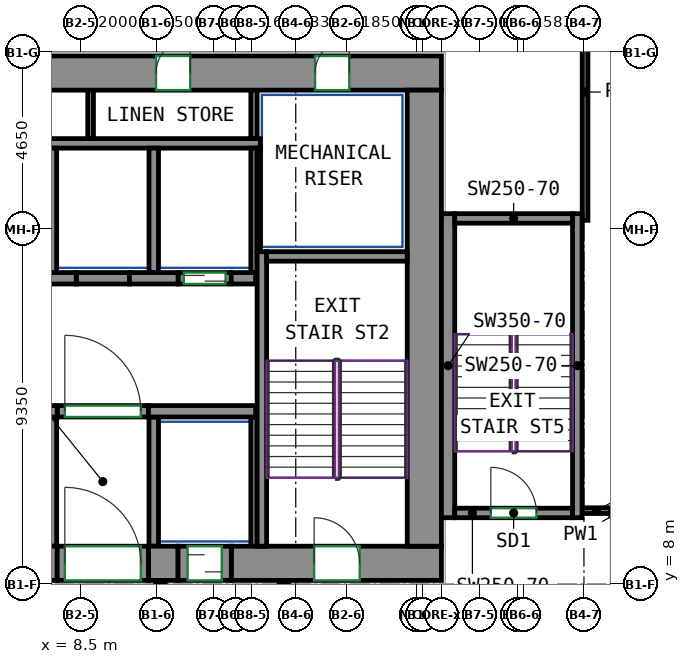
"""IFC4 building model, lengths in metres.
Left out: names, types, materials, properties, quantities, classifications, styles, units other than length and angle.
Written with IfcOpenShell. Run it as: python <this file> out.ifc"""

import sys

from ifc_helpers import new_model, si_unit, direction, frame, frame_2d, origin, place, context, subcontext, project, spatial, rectangle, extrude, source, transform, mapped, element, fill, save


model = new_model("IFC4")
c1 = context("Model", 3, precision=1e-05, world=origin(), true_north=direction((0.0, 1.0)))
c2 = subcontext(c1, "Body", "Model", "MODEL_VIEW")
j1 = project(units=[si_unit("LENGTHUNIT", "METRE"), si_unit("PLANEANGLEUNIT", "RADIAN")], contexts=[c1])
p1 = place(None, origin())
s1 = spatial("IfcSite", under=j1, at=p1, CompositionType="ELEMENT")
p2 = place(p1, origin())
s2 = spatial("IfcBuilding", under=s1, at=p2, CompositionType="ELEMENT")
p3 = place(p2, frame((0.0, 0.0, 164.3)))
s3 = spatial("IfcBuildingStorey", under=s2, at=p3, CompositionType="ELEMENT", Elevation=164.3)
m1 = source(origin(), c2, "Body", "SweptSolid", [
    extrude(rectangle(XDim=14.18, YDim=0.9, at=frame_2d((7.09, 0.0))), origin(), (0.0, 0.0, 1.0), 3.8),
])
p4 = place(p3, frame((-6.29, 8.55, 0.0), z_axis=(0.0, 0.0, 1.0), x_axis=(1.0, 0.0, 0.0)))
e1 = element("IfcWall", 1, at=p4, inside=s3, PredefinedType="SHEAR", context=c2, shape_type="MappedRepresentation", body=[
    mapped(m1, transform((0.0, 0.0, 0.0))),
])
m2 = source(origin(), c2, "Body", "SweptSolid", [
    extrude(rectangle(XDim=0.78, YDim=0.9, at=frame_2d((0.39, 0.0))), origin(), (0.0, 0.0, 1.0), 3.8),
])
p5 = place(p3, frame((10.29, 8.55, 0.0), z_axis=(0.0, 0.0, 1.0), x_axis=(1.0, 0.0, 0.0)))
e2 = element("IfcWall", 2, at=p5, inside=s3, PredefinedType="SHEAR", context=c2, shape_type="MappedRepresentation", body=[
    mapped(m2, transform((0.0, 0.0, 0.0))),
])
m3 = source(origin(), c2, "Body", "SweptSolid", [
    extrude(rectangle(XDim=5.53, YDim=0.9, at=frame_2d((2.765, 0.0))), origin(), (0.0, 0.0, 1.0), 3.8),
])
p6 = place(p3, frame((12.47, 8.55, 0.0), z_axis=(0.0, 0.0, 1.0), x_axis=(1.0, 0.0, 0.0)))
e3 = element("IfcWall", 3, at=p6, inside=s3, PredefinedType="SHEAR", context=c2, shape_type="MappedRepresentation", body=[
    mapped(m3, transform((0.0, 0.0, 0.0))),
])
p7 = place(p6, frame((2.18, 0.0, 0.0)))
e4 = element("IfcOpeningElement", 4, at=p7, cuts=e3, PredefinedType="OPENING", context=c2, shape_type="SweptSolid", body=[
    extrude(rectangle(XDim=1.2, YDim=2.1, at=frame_2d((0.6, 1.05))), frame((0.0, 0.46, 0.0), z_axis=(0.0, -1.0, 0.0), x_axis=(1.0, 0.0, 0.0)), (0.0, 0.0, 1.0), 0.92),
])
m4 = source(origin(), c2, "Body", "SweptSolid", [
    extrude(rectangle(XDim=33.9, YDim=0.9, at=frame_2d((16.95, 0.0))), origin(), (0.0, 0.0, 1.0), 3.8),
])
p8 = place(p3, frame((-15.9, 21.45, 0.0), z_axis=(0.0, 0.0, 1.0), x_axis=(1.0, 0.0, 0.0)))
e5 = element("IfcWall", 5, at=p8, inside=s3, PredefinedType="SHEAR", context=c2, shape_type="MappedRepresentation", body=[
    mapped(m4, transform((0.0, 0.0, 0.0))),
])
p9 = place(p8, frame((6.008, 0.0, 0.0)))
e6 = element("IfcOpeningElement", 6, at=p9, cuts=e5, PredefinedType="OPENING", context=c2, shape_type="SweptSolid", body=[
    extrude(rectangle(XDim=0.9, YDim=2.1, at=frame_2d((0.45, 1.05))), frame((0.0, 0.46, 0.0), z_axis=(0.0, -1.0, 0.0), x_axis=(1.0, 0.0, 0.0)), (0.0, 0.0, 1.0), 0.92),
])
p10 = place(p8, frame((11.073, 0.0, 0.0)))
e7 = element("IfcOpeningElement", 7, at=p10, cuts=e5, PredefinedType="OPENING", context=c2, shape_type="SweptSolid", body=[
    extrude(rectangle(XDim=0.9, YDim=2.1, at=frame_2d((0.45, 1.05))), frame((0.0, 0.46, 0.0), z_axis=(0.0, -1.0, 0.0), x_axis=(1.0, 0.0, 0.0)), (0.0, 0.0, 1.0), 0.92),
])
p11 = place(p8, frame((16.205, 0.0, 0.0)))
e8 = element("IfcOpeningElement", 8, at=p11, cuts=e5, PredefinedType="OPENING", context=c2, shape_type="SweptSolid", body=[
    extrude(rectangle(XDim=0.9, YDim=2.1, at=frame_2d((0.45, 1.05))), frame((0.0, 0.46, 0.0), z_axis=(0.0, -1.0, 0.0), x_axis=(1.0, 0.0, 0.0)), (0.0, 0.0, 1.0), 0.92),
])
p12 = place(p8, frame((21.029, 0.0, 0.0)))
e9 = element("IfcOpeningElement", 9, at=p12, cuts=e5, PredefinedType="OPENING", context=c2, shape_type="SweptSolid", body=[
    extrude(rectangle(XDim=0.9, YDim=2.1, at=frame_2d((0.45, 1.05))), frame((0.0, 0.46, 0.0), z_axis=(0.0, -1.0, 0.0), x_axis=(1.0, 0.0, 0.0)), (0.0, 0.0, 1.0), 0.92),
])
p13 = place(p8, frame((26.389, 0.0, 0.0)))
e10 = element("IfcOpeningElement", 10, at=p13, cuts=e5, PredefinedType="OPENING", context=c2, shape_type="SweptSolid", body=[
    extrude(rectangle(XDim=0.9, YDim=2.1, at=frame_2d((0.45, 1.05))), frame((0.0, 0.46, 0.0), z_axis=(0.0, -1.0, 0.0), x_axis=(1.0, 0.0, 0.0)), (0.0, 0.0, 1.0), 0.92),
])
p14 = place(p8, frame((2.425, 0.0, 0.0)))
e11 = element("IfcOpeningElement", 11, at=p14, cuts=e5, PredefinedType="OPENING", context=c2, shape_type="SweptSolid", body=[
    extrude(rectangle(XDim=0.9, YDim=2.1, at=frame_2d((0.45, 1.05))), frame((0.0, 0.46, 0.0), z_axis=(0.0, -1.0, 0.0), x_axis=(1.0, 0.0, 0.0)), (0.0, 0.0, 1.0), 0.92),
])
p15 = place(p8, frame((30.575, 0.0, 0.0)))
e12 = element("IfcOpeningElement", 12, at=p15, cuts=e5, PredefinedType="OPENING", context=c2, shape_type="SweptSolid", body=[
    extrude(rectangle(XDim=0.9, YDim=2.1, at=frame_2d((0.45, 1.05))), frame((0.0, 0.46, 0.0), z_axis=(0.0, -1.0, 0.0), x_axis=(1.0, 0.0, 0.0)), (0.0, 0.0, 1.0), 0.92),
])
m5 = source(origin(), c2, "Body", "SweptSolid", [
    extrude(rectangle(XDim=12.0, YDim=0.9, at=frame_2d((6.0, 0.0))), origin(), (0.0, 0.0, 1.0), 3.8),
])
p16 = place(p3, frame((17.55, 9.0, 0.0), z_axis=(0.0, 0.0, 1.0), x_axis=(0.0, 1.0, 0.0)))
e13 = element("IfcWall", 13, at=p16, inside=s3, PredefinedType="SHEAR", context=c2, shape_type="MappedRepresentation", body=[
    mapped(m5, transform((0.0, 0.0, 0.0))),
])
m6 = source(origin(), c2, "Body", "SweptSolid", [
    extrude(rectangle(XDim=7.75, YDim=0.25, at=frame_2d((3.875, 0.0))), origin(), (0.0, 0.0, 1.0), 3.8),
])
p17 = place(p3, frame((13.275, 9.0, 0.0), z_axis=(0.0, 0.0, 1.0), x_axis=(0.0, 1.0, 0.0)))
e14 = element("IfcWall", 14, at=p17, inside=s3, PredefinedType="SHEAR", context=c2, shape_type="MappedRepresentation", body=[
    mapped(m6, transform((0.0, 0.0, 0.0))),
])
m7 = source(origin(), c2, "Body", "SweptSolid", [
    extrude(rectangle(XDim=3.7, YDim=0.25, at=frame_2d((1.85, 0.0))), origin(), (0.0, 0.0, 1.0), 3.8),
])
p18 = place(p3, frame((13.4, 16.625, 0.0), z_axis=(0.0, 0.0, 1.0), x_axis=(1.0, 0.0, 0.0)))
e15 = element("IfcWall", 15, at=p18, inside=s3, PredefinedType="SHEAR", context=c2, shape_type="MappedRepresentation", body=[
    mapped(m7, transform((0.0, 0.0, 0.0))),
])
m8 = source(origin(), c2, "Body", "SweptSolid", [
    extrude(rectangle(XDim=8.0, YDim=0.35, at=frame_2d((4.0, 0.0))), origin(), (0.0, 0.0, 1.0), 3.8),
])
p19 = place(p3, frame((18.175, 9.75, 0.0), z_axis=(0.0, 0.0, 1.0), x_axis=(0.0, 1.0, 0.0)))
e16 = element("IfcWall", 16, at=p19, inside=s3, PredefinedType="SHEAR", context=c2, shape_type="MappedRepresentation", body=[
    mapped(m8, transform((0.0, 0.0, 0.0))),
])
m9 = source(origin(), c2, "Body", "SweptSolid", [
    extrude(rectangle(XDim=8.0, YDim=0.25, at=frame_2d((4.0, 0.0))), origin(), (0.0, 0.0, 1.0), 3.8),
])
p20 = place(p3, frame((21.575, 9.75, 0.0), z_axis=(0.0, 0.0, 1.0), x_axis=(0.0, 1.0, 0.0)))
e17 = element("IfcWall", 17, at=p20, inside=s3, PredefinedType="SHEAR", context=c2, shape_type="MappedRepresentation", body=[
    mapped(m9, transform((0.0, 0.0, 0.0))),
])
m10 = source(origin(), c2, "Body", "SweptSolid", [
    extrude(rectangle(XDim=3.1, YDim=0.25, at=frame_2d((1.55, 0.0))), origin(), (0.0, 0.0, 1.0), 3.8),
])
p21 = place(p3, frame((18.35, 9.875, 0.0), z_axis=(0.0, 0.0, 1.0), x_axis=(1.0, 0.0, 0.0)))
e18 = element("IfcWall", 18, at=p21, inside=s3, PredefinedType="SHEAR", context=c2, shape_type="MappedRepresentation", body=[
    mapped(m10, transform((0.0, 0.0, 0.0))),
])
p22 = place(p21, frame((0.95, 0.0, 0.0)))
e19 = element("IfcOpeningElement", 19, at=p22, cuts=e18, PredefinedType="OPENING", context=c2, shape_type="SweptSolid", body=[
    extrude(rectangle(XDim=1.2, YDim=2.1, at=frame_2d((0.6, 1.05))), frame((0.0, 0.135, 0.0), z_axis=(0.0, -1.0, 0.0), x_axis=(1.0, 0.0, 0.0)), (0.0, 0.0, 1.0), 0.27),
])
p23 = place(p3, frame((18.35, 17.625, 0.0), z_axis=(0.0, 0.0, 1.0), x_axis=(1.0, 0.0, 0.0)))
e20 = element("IfcWall", 20, at=p23, inside=s3, PredefinedType="SHEAR", context=c2, shape_type="MappedRepresentation", body=[
    mapped(m10, transform((0.0, 0.0, 0.0))),
])
m11 = source(origin(), c2, "Body", "SweptSolid", [
    extrude(rectangle(XDim=0.78, YDim=0.3, at=frame_2d((0.39, 0.0))), origin(), (0.0, 0.0, 1.0), 3.8),
])
p24 = place(p3, frame((7.11, 12.55, 0.0), z_axis=(0.0, 0.0, 1.0), x_axis=(1.0, 0.0, 0.0)))
e21 = element("IfcWall", 21, at=p24, inside=s3, PredefinedType="SHEAR", context=c2, shape_type="MappedRepresentation", body=[
    mapped(m11, transform((0.0, 0.0, 0.0))),
])
m12 = source(origin(), c2, "Body", "SweptSolid", [
    extrude(rectangle(XDim=2.82, YDim=0.3, at=frame_2d((1.41, 0.0))), origin(), (0.0, 0.0, 1.0), 3.8),
])
p25 = place(p3, frame((10.29, 12.55, 0.0), z_axis=(0.0, 0.0, 1.0), x_axis=(1.0, 0.0, 0.0)))
e22 = element("IfcWall", 22, at=p25, inside=s3, PredefinedType="SHEAR", context=c2, shape_type="MappedRepresentation", body=[
    mapped(m12, transform((0.0, 0.0, 0.0))),
])
m13 = source(origin(), c2, "Body", "SweptSolid", [
    extrude(rectangle(XDim=1.28, YDim=0.3, at=frame_2d((0.64, 0.0))), origin(), (0.0, 0.0, 1.0), 3.8),
])
p26 = place(p3, frame((7.11, 16.05, 0.0), z_axis=(0.0, 0.0, 1.0), x_axis=(1.0, 0.0, 0.0)))
e23 = element("IfcWall", 23, at=p26, inside=s3, PredefinedType="SHEAR", context=c2, shape_type="MappedRepresentation", body=[
    mapped(m13, transform((0.0, 0.0, 0.0))),
])
m14 = source(origin(), c2, "Body", "SweptSolid", [
    extrude(rectangle(XDim=1.28, YDim=0.3, at=frame_2d((0.64, 0.0))), origin(), (0.0, 0.0, 1.0), 3.8),
])
p27 = place(p3, frame((9.79, 16.05, 0.0), z_axis=(0.0, 0.0, 1.0), x_axis=(1.0, 0.0, 0.0)))
e24 = element("IfcWall", 24, at=p27, inside=s3, PredefinedType="SHEAR", context=c2, shape_type="MappedRepresentation", body=[
    mapped(m14, transform((0.0, 0.0, 0.0))),
])
m15 = source(origin(), c2, "Body", "SweptSolid", [
    extrude(rectangle(XDim=0.64, YDim=0.3, at=frame_2d((0.32, 0.0))), origin(), (0.0, 0.0, 1.0), 3.8),
])
p28 = place(p3, frame((12.47, 16.05, 0.0), z_axis=(0.0, 0.0, 1.0), x_axis=(1.0, 0.0, 0.0)))
e25 = element("IfcWall", 25, at=p28, inside=s3, PredefinedType="SHEAR", context=c2, shape_type="MappedRepresentation", body=[
    mapped(m15, transform((0.0, 0.0, 0.0))),
])
m16 = source(origin(), c2, "Body", "SweptSolid", [
    extrude(rectangle(XDim=1.4, YDim=0.3, at=frame_2d((0.7, 0.0))), origin(), (0.0, 0.0, 1.0), 3.8),
])
p29 = place(p3, frame((11.07, 16.05, 0.0), z_axis=(0.0, 0.0, 1.0), x_axis=(1.0, 0.0, 0.0)))
e26 = element("IfcWall", 26, at=p29, inside=s3, PredefinedType="PARTITIONING", context=c2, shape_type="MappedRepresentation", body=[
    mapped(m16, transform((0.0, 0.0, 0.0))),
])
p30 = place(p29, frame((0.15, 0.0, 0.0)))
e27 = element("IfcOpeningElement", 27, at=p30, cuts=e26, PredefinedType="OPENING", context=c2, shape_type="SweptSolid", body=[
    extrude(rectangle(XDim=1.1, YDim=2.1, at=frame_2d((0.55, 1.05))), frame((0.0, 0.16, 0.0), z_axis=(0.0, -1.0, 0.0), x_axis=(1.0, 0.0, 0.0)), (0.0, 0.0, 1.0), 0.32),
])
m17 = source(origin(), c2, "Body", "SweptSolid", [
    extrude(rectangle(XDim=2.4, YDim=0.3, at=frame_2d((1.2, 0.0))), origin(), (0.0, 0.0, 1.0), 3.8),
])
p31 = place(p3, frame((7.89, 12.55, 0.0), z_axis=(0.0, 0.0, 1.0), x_axis=(1.0, 0.0, 0.0)))
e28 = element("IfcWall", 28, at=p31, inside=s3, PredefinedType="PARTITIONING", context=c2, shape_type="MappedRepresentation", body=[
    mapped(m17, transform((0.0, 0.0, 0.0))),
])
p32 = place(p31, frame((0.2, 0.0, 0.0)))
e29 = element("IfcOpeningElement", 29, at=p32, cuts=e28, PredefinedType="OPENING", context=c2, shape_type="SweptSolid", body=[
    extrude(rectangle(XDim=2.0, YDim=2.1, at=frame_2d((1.0, 1.05))), frame((0.0, 0.16, 0.0), z_axis=(0.0, -1.0, 0.0), x_axis=(1.0, 0.0, 0.0)), (0.0, 0.0, 1.0), 0.32),
])
m18 = source(origin(), c2, "Body", "SweptSolid", [
    extrude(rectangle(XDim=1.4, YDim=0.3, at=frame_2d((0.7, 0.0))), origin(), (0.0, 0.0, 1.0), 3.8),
])
p33 = place(p3, frame((8.39, 16.05, 0.0), z_axis=(0.0, 0.0, 1.0), x_axis=(1.0, 0.0, 0.0)))
e30 = element("IfcWall", 30, at=p33, inside=s3, PredefinedType="PARTITIONING", context=c2, shape_type="MappedRepresentation", body=[
    mapped(m18, transform((0.0, 0.0, 0.0))),
])
m19 = source(origin(), c2, "Body", "SweptSolid", [
    extrude(rectangle(XDim=10.97, YDim=0.25, at=frame_2d((5.485, 0.0))), origin(), (0.0, 0.0, 1.0), 3.8),
])
p34 = place(p3, frame((2.265, 19.6, 0.0), z_axis=(0.0, 0.0, 1.0), x_axis=(1.0, 0.0, 0.0)))
e31 = element("IfcWall", 31, at=p34, inside=s3, PredefinedType="PARTITIONING", context=c2, shape_type="MappedRepresentation", body=[
    mapped(m19, transform((0.0, 0.0, 0.0))),
])
m20 = source(origin(), c2, "Body", "SweptSolid", [
    extrude(rectangle(XDim=3.275, YDim=0.165, at=frame_2d((1.638, 0.0))), origin(), (0.0, 0.0, 1.0), 3.8),
])
p35 = place(p3, frame((13.067, 16.2, 0.0), z_axis=(0.0, 0.0, 1.0), x_axis=(0.0, 1.0, 0.0)))
e32 = element("IfcWall", 32, at=p35, inside=s3, PredefinedType="PARTITIONING", context=c2, shape_type="MappedRepresentation", body=[
    mapped(m20, transform((0.0, 0.0, 0.0))),
])
m21 = source(origin(), c2, "Body", "SweptSolid", [
    extrude(rectangle(XDim=1.275, YDim=0.165, at=frame_2d((0.637, 0.0))), origin(), (0.0, 0.0, 1.0), 3.8),
])
p36 = place(p3, frame((13.067, 19.725, 0.0), z_axis=(0.0, 0.0, 1.0), x_axis=(0.0, 1.0, 0.0)))
e33 = element("IfcWall", 33, at=p36, inside=s3, PredefinedType="PARTITIONING", context=c2, shape_type="MappedRepresentation", body=[
    mapped(m21, transform((0.0, 0.0, 0.0))),
])
m22 = source(origin(), c2, "Body", "SweptSolid", [
    extrude(rectangle(XDim=3.275, YDim=0.25, at=frame_2d((1.638, 0.0))), origin(), (0.0, 0.0, 1.0), 3.8),
])
p37 = place(p3, frame((10.43, 16.2, 0.0), z_axis=(0.0, 0.0, 1.0), x_axis=(0.0, 1.0, 0.0)))
e34 = element("IfcWall", 34, at=p37, inside=s3, PredefinedType="PARTITIONING", context=c2, shape_type="MappedRepresentation", body=[
    mapped(m22, transform((0.0, 0.0, 0.0))),
])
m23 = source(origin(), c2, "Body", "SweptSolid", [
    extrude(rectangle(XDim=2.725, YDim=0.085, at=frame_2d((1.363, 0.0))), origin(), (0.0, 0.0, 1.0), 3.8),
])
p38 = place(p3, frame((13.192, 16.75, 0.0), z_axis=(0.0, 0.0, 1.0), x_axis=(0.0, 1.0, 0.0)))
e35 = element("IfcWall", 35, at=p38, inside=s3, PredefinedType="PARTITIONING", context=c2, shape_type="MappedRepresentation", body=[
    mapped(m23, transform((0.0, 0.0, 0.0))),
])
p39 = place(p3, frame((7.75, 16.2, 0.0), z_axis=(0.0, 0.0, 1.0), x_axis=(0.0, 1.0, 0.0)))
e36 = element("IfcWall", 36, at=p39, inside=s3, PredefinedType="PARTITIONING", context=c2, shape_type="MappedRepresentation", body=[
    mapped(m22, transform((0.0, 0.0, 0.0))),
])
m24 = source(origin(), c2, "Body", "SweptSolid", [
    extrude(rectangle(XDim=3.4, YDim=0.25, at=frame_2d((1.7, 0.0))), origin(), (0.0, 0.0, 1.0), 3.8),
])
p40 = place(p3, frame((10.43, 9.0, 0.0), z_axis=(0.0, 0.0, 1.0), x_axis=(0.0, 1.0, 0.0)))
e37 = element("IfcWall", 37, at=p40, inside=s3, PredefinedType="PARTITIONING", context=c2, shape_type="MappedRepresentation", body=[
    mapped(m24, transform((0.0, 0.0, 0.0))),
])
m25 = source(origin(), c2, "Body", "SweptSolid", [
    extrude(rectangle(XDim=3.4, YDim=0.165, at=frame_2d((1.7, 0.0))), origin(), (0.0, 0.0, 1.0), 3.8),
])
p41 = place(p3, frame((13.067, 9.0, 0.0), z_axis=(0.0, 0.0, 1.0), x_axis=(0.0, 1.0, 0.0)))
e38 = element("IfcWall", 38, at=p41, inside=s3, PredefinedType="PARTITIONING", context=c2, shape_type="MappedRepresentation", body=[
    mapped(m25, transform((0.0, 0.0, 0.0))),
])
p42 = place(p3, frame((7.75, 9.0, 0.0), z_axis=(0.0, 0.0, 1.0), x_axis=(0.0, 1.0, 0.0)))
e39 = element("IfcWall", 39, at=p42, inside=s3, PredefinedType="PARTITIONING", context=c2, shape_type="MappedRepresentation", body=[
    mapped(m24, transform((0.0, 0.0, 0.0))),
])
m26 = source(origin(), c2, "Body", "SweptSolid", [
    extrude(rectangle(XDim=1.275, YDim=0.15, at=frame_2d((0.637, 0.0))), origin(), (0.0, 0.0, 1.0), 3.8),
])
p43 = place(p3, frame((8.768, 19.725, 0.0), z_axis=(0.0, 0.0, 1.0), x_axis=(0.0, 1.0, 0.0)))
e40 = element("IfcWall", 40, at=p43, inside=s3, PredefinedType="PARTITIONING", context=c2, shape_type="MappedRepresentation", body=[
    mapped(m26, transform((0.0, 0.0, 0.0))),
])
m27 = source(origin(), c2, "Body", "SweptSolid", [
    extrude(rectangle(XDim=2.4, YDim=0.9, at=frame_2d((1.2, 0.0))), origin(), (0.0, 0.0, 1.0), 2.7),
])
p44 = place(p3, frame((7.89, 8.55, 0.0), z_axis=(0.0, 0.0, 1.0), x_axis=(1.0, 0.0, 0.0)))
e41 = element("IfcWall", 41, at=p44, inside=s3, PredefinedType="PARTITIONING", context=c2, shape_type="MappedRepresentation", body=[
    mapped(m27, transform((0.0, 0.0, 0.0))),
])
p45 = place(p44, frame((0.2, 0.0, 0.0)))
e42 = element("IfcOpeningElement", 42, at=p45, cuts=e41, PredefinedType="OPENING", context=c2, shape_type="SweptSolid", body=[
    extrude(rectangle(XDim=2.0, YDim=2.1, at=frame_2d((1.0, 1.05))), frame((0.0, 0.46, 0.0), z_axis=(0.0, -1.0, 0.0), x_axis=(1.0, 0.0, 0.0)), (0.0, 0.0, 1.0), 0.92),
])
m28 = source(origin(), c2, "Body", "SweptSolid", [
    extrude(rectangle(XDim=1.4, YDim=0.9, at=frame_2d((0.7, 0.0))), origin(), (0.0, 0.0, 1.0), 2.7),
])
p46 = place(p3, frame((11.07, 8.55, 0.0), z_axis=(0.0, 0.0, 1.0), x_axis=(1.0, 0.0, 0.0)))
e43 = element("IfcWall", 43, at=p46, inside=s3, PredefinedType="PARTITIONING", context=c2, shape_type="MappedRepresentation", body=[
    mapped(m28, transform((0.0, 0.0, 0.0))),
])
p47 = place(p46, frame((0.25, 0.0, 0.0)))
e44 = element("IfcOpeningElement", 44, at=p47, cuts=e43, PredefinedType="OPENING", context=c2, shape_type="SweptSolid", body=[
    extrude(rectangle(XDim=0.9, YDim=2.1, at=frame_2d((0.45, 1.05))), frame((0.0, 0.46, 0.0), z_axis=(0.0, -1.0, 0.0), x_axis=(1.0, 0.0, 0.0)), (0.0, 0.0, 1.0), 0.92),
])
p48 = place(p3, frame((21.78, 17.575, 0.0), z_axis=(0.0, 0.0, 1.0), x_axis=(0.0, 1.0, 0.0)))
e45 = element("IfcWall", 45, at=p48, inside=s3, PredefinedType="PARTITIONING", context=c2, shape_type="SweptSolid", body=[
    extrude(rectangle(XDim=6.75, YDim=0.15, at=frame_2d((3.375, 0.0))), origin(), (0.0, 0.0, 1.0), 3.8),
])
p49 = place(p3, frame((22.456, 9.936, 0.0), z_axis=(0.0, 0.0, 1.0), x_axis=(-1.0, 0.0, 0.0)))
e46 = element("IfcWall", 46, at=p49, inside=s3, PredefinedType="PARTITIONING", context=c2, shape_type="SweptSolid", body=[
    extrude(rectangle(XDim=0.756, YDim=0.15, at=frame_2d((0.378, 0.0))), origin(), (0.0, 0.0, 1.0), 3.8),
])
p50 = place(p32, origin())
e47 = element("IfcDoor", 47, at=p50, inside=s3, OperationType="DOUBLE_DOOR_SINGLE_SWING", PredefinedType="DOOR", context=c2, shape_type="SweptSolid", body=[
    extrude(rectangle(XDim=2.0, YDim=2.1, at=frame_2d((1.0, 1.05))), frame((0.0, 0.025, 0.0), z_axis=(0.0, -1.0, 0.0), x_axis=(1.0, 0.0, 0.0)), (0.0, 0.0, 1.0), 0.05),
])
fill(e29, e47)
p51 = place(p45, origin())
e48 = element("IfcDoor", 48, at=p51, inside=s3, OperationType="DOUBLE_DOOR_SINGLE_SWING", PredefinedType="DOOR", context=c2, shape_type="SweptSolid", body=[
    extrude(rectangle(XDim=2.0, YDim=2.1, at=frame_2d((1.0, 1.05))), frame((0.0, 0.355, 0.0), z_axis=(0.0, -1.0, 0.0), x_axis=(1.0, 0.0, 0.0)), (0.0, 0.0, 1.0), 0.05),
])
fill(e42, e48)
p52 = place(p47, origin())
e49 = element("IfcDoor", 49, at=p52, inside=s3, OperationType="SLIDING_TO_LEFT", PredefinedType="DOOR", context=c2, shape_type="SweptSolid", body=[
    extrude(rectangle(XDim=0.9, YDim=2.1, at=frame_2d((0.45, 1.05))), frame((0.0, 0.355, 0.0), z_axis=(0.0, -1.0, 0.0), x_axis=(1.0, 0.0, 0.0)), (0.0, 0.0, 1.0), 0.05),
])
fill(e44, e49)
p53 = place(p30, origin())
e50 = element("IfcDoor", 50, at=p53, inside=s3, OperationType="DOUBLE_DOOR_SLIDING", PredefinedType="DOOR", context=c2, shape_type="SweptSolid", body=[
    extrude(rectangle(XDim=1.1, YDim=2.1, at=frame_2d((0.55, 1.05))), frame((0.0, 0.025, 0.0), z_axis=(0.0, -1.0, 0.0), x_axis=(1.0, 0.0, 0.0)), (0.0, 0.0, 1.0), 0.05),
])
fill(e27, e50)
p54 = place(p13, origin())
e51 = element("IfcDoor", 51, at=p54, inside=s3, OperationType="SINGLE_SWING_RIGHT", PredefinedType="DOOR", context=c2, shape_type="SweptSolid", body=[
    extrude(rectangle(XDim=0.9, YDim=2.1, at=frame_2d((0.45, 1.05))), frame((0.0, -0.305, 0.0), z_axis=(0.0, -1.0, 0.0), x_axis=(1.0, 0.0, 0.0)), (0.0, 0.0, 1.0), 0.05),
])
fill(e10, e51)
p55 = place(p15, origin())
e52 = element("IfcDoor", 52, at=p55, inside=s3, OperationType="SINGLE_SWING_RIGHT", PredefinedType="DOOR", context=c2, shape_type="SweptSolid", body=[
    extrude(rectangle(XDim=0.9, YDim=2.1, at=frame_2d((0.45, 1.05))), frame((0.0, -0.305, 0.0), z_axis=(0.0, -1.0, 0.0), x_axis=(1.0, 0.0, 0.0)), (0.0, 0.0, 1.0), 0.05),
])
fill(e12, e52)
p56 = place(p7, origin())
e53 = element("IfcDoor", 53, at=p56, inside=s3, OperationType="DOUBLE_DOOR_SINGLE_SWING", PredefinedType="DOOR", context=c2, shape_type="SweptSolid", body=[
    extrude(rectangle(XDim=1.2, YDim=2.1, at=frame_2d((0.6, 1.05))), frame((0.0, 0.355, 0.0), z_axis=(0.0, -1.0, 0.0), x_axis=(1.0, 0.0, 0.0)), (0.0, 0.0, 1.0), 0.05),
])
fill(e4, e53)
p57 = place(p22, origin())
e54 = element("IfcDoor", 54, at=p57, inside=s3, OperationType="DOUBLE_DOOR_SINGLE_SWING", PredefinedType="DOOR", context=c2, shape_type="SweptSolid", body=[
    extrude(rectangle(XDim=1.2, YDim=2.1, at=frame_2d((0.6, 1.05))), frame((0.0, 0.025, 0.0), z_axis=(0.0, -1.0, 0.0), x_axis=(1.0, 0.0, 0.0)), (0.0, 0.0, 1.0), 0.05),
])
fill(e19, e54)
save(model, sys.argv[1])
